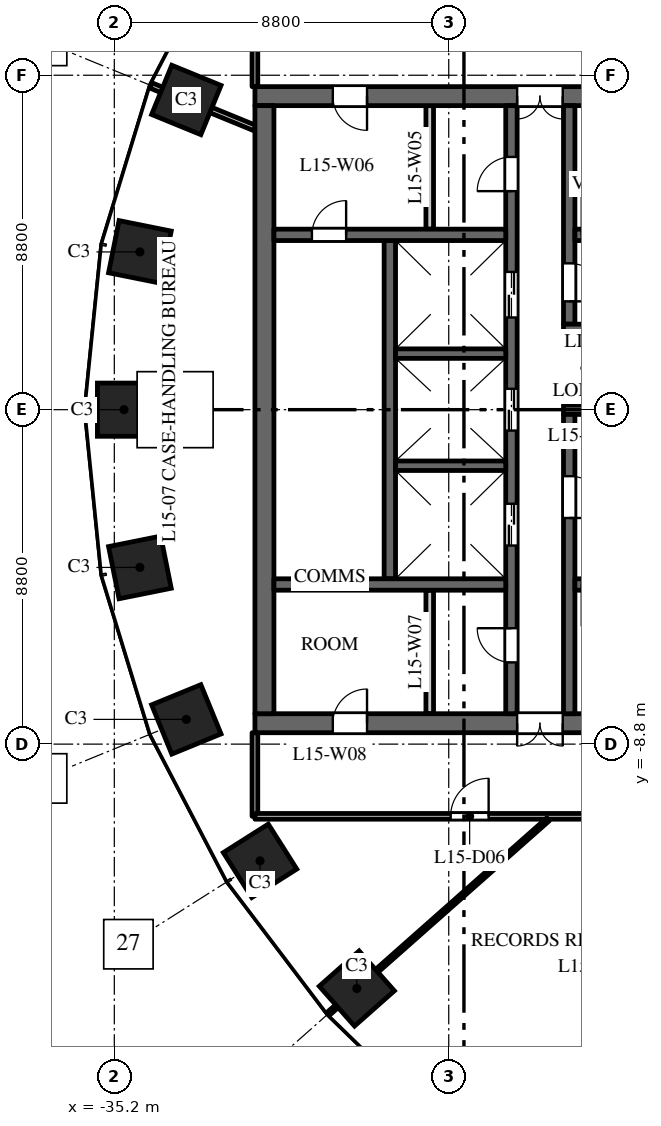
"""IFC4 building model, lengths in metres.
Left out: names, types, materials, properties, quantities, classifications, styles, units other than length and angle.
Written with IfcOpenShell. Run it as: python <this file> out.ifc"""

import sys

from ifc_helpers import new_model, si_unit, direction, frame, frame_2d, origin, origin_2d, place, context, subcontext, project, spatial, rectangle, extrude, element, fill, save


model = new_model("IFC4")
c1 = context("Model", 3, precision=1e-05, world=origin(), true_north=direction((0.0, 1.0)))
c2 = subcontext(c1, "Body", "Model", "MODEL_VIEW")
j1 = project(units=[si_unit("LENGTHUNIT", "METRE"), si_unit("PLANEANGLEUNIT", "RADIAN")], contexts=[c1])
p1 = place(None, origin())
s1 = spatial("IfcSite", under=j1, at=p1, CompositionType="ELEMENT")
p2 = place(p1, origin())
s2 = spatial("IfcBuilding", under=s1, at=p2, CompositionType="ELEMENT")
p3 = place(p2, frame((0.0, 0.0, 70.5)))
s3 = spatial("IfcBuildingStorey", under=s2, at=p3, CompositionType="ELEMENT", Elevation=70.5)
for number, where, z_axis, x_axis in (
    (1, (-33.305, 8.149, 0.0), (0.0, 0.0, 1.0), (-0.379, -0.925, 0.0)),
    (2, (-34.527, 4.151, 0.0), (0.0, 0.0, 1.0), (-0.197, -0.98, 0.0)),
    (3, (-34.945, 0.0, 0.0), (0.0, 0.0, 1.0), (0.0, -1.0, 0.0)),
    (4, (-34.527, -4.151, 0.0), (0.0, 0.0, 1.0), (0.197, -0.98, 0.0)),
    (5, (-33.305, -8.149, 0.0), (0.0, 0.0, 1.0), (0.379, -0.925, 0.0)),
    (6, (-31.365, -11.871, 0.0), (0.0, 0.0, 1.0), (0.535, -0.845, 0.0)),
    (7, (-28.819, -15.23, 0.0), (0.0, 0.0, 1.0), (0.663, -0.749, 0.0)),
):
    element("IfcColumn", number, at=place(p3, frame(where, z_axis=z_axis, x_axis=x_axis)), inside=s3, PredefinedType="COLUMN", context=c2, shape_type="SweptSolid", body=[
        extrude(rectangle(XDim=1.4, YDim=1.4, at=origin_2d()), origin(), (0.0, 0.0, 1.0), 4.0),
    ])
p4 = place(p3, frame((-16.5, 8.25, 0.0), z_axis=(0.0, 0.0, 1.0), x_axis=(-1.0, 0.0, 0.0)))
e8 = element("IfcWall", 8, at=p4, inside=s3, PredefinedType="SHEAR", context=c2, shape_type="SweptSolid", body=[
    extrude(rectangle(XDim=15.0, YDim=0.5, at=frame_2d((7.5, 0.0))), origin(), (0.0, 0.0, 1.0), 3.7),
])
p5 = place(p4, frame((6.9, 0.0, 0.0)))
e9 = element("IfcOpeningElement", 9, at=p5, cuts=e8, PredefinedType="OPENING", context=c2, shape_type="SweptSolid", body=[
    extrude(rectangle(XDim=1.2, YDim=2.1, at=frame_2d((0.6, 1.05))), frame((0.0, 0.26, 0.0), z_axis=(0.0, -1.0, 0.0), x_axis=(1.0, 0.0, 0.0)), (0.0, 0.0, 1.0), 0.52),
])
p6 = place(p4, frame((12.05, 0.0, 0.0)))
e10 = element("IfcOpeningElement", 10, at=p6, cuts=e8, PredefinedType="OPENING", context=c2, shape_type="SweptSolid", body=[
    extrude(rectangle(XDim=0.9, YDim=2.1, at=frame_2d((0.45, 1.05))), frame((0.0, 0.26, 0.0), z_axis=(0.0, -1.0, 0.0), x_axis=(1.0, 0.0, 0.0)), (0.0, 0.0, 1.0), 0.52),
])
p7 = place(p3, frame((-16.5, -8.25, 0.0), z_axis=(0.0, 0.0, 1.0), x_axis=(-1.0, 0.0, 0.0)))
e11 = element("IfcWall", 11, at=p7, inside=s3, PredefinedType="SHEAR", context=c2, shape_type="SweptSolid", body=[
    extrude(rectangle(XDim=15.0, YDim=0.5, at=frame_2d((7.5, 0.0))), origin(), (0.0, 0.0, 1.0), 3.7),
])
p8 = place(p7, frame((6.9, 0.0, 0.0)))
e12 = element("IfcOpeningElement", 12, at=p8, cuts=e11, PredefinedType="OPENING", context=c2, shape_type="SweptSolid", body=[
    extrude(rectangle(XDim=1.2, YDim=2.1, at=frame_2d((0.6, 1.05))), frame((0.0, 0.26, 0.0), z_axis=(0.0, -1.0, 0.0), x_axis=(1.0, 0.0, 0.0)), (0.0, 0.0, 1.0), 0.52),
])
p9 = place(p7, frame((12.05, 0.0, 0.0)))
e13 = element("IfcOpeningElement", 13, at=p9, cuts=e11, PredefinedType="OPENING", context=c2, shape_type="SweptSolid", body=[
    extrude(rectangle(XDim=0.9, YDim=2.1, at=frame_2d((0.45, 1.05))), frame((0.0, 0.26, 0.0), z_axis=(0.0, -1.0, 0.0), x_axis=(1.0, 0.0, 0.0)), (0.0, 0.0, 1.0), 0.52),
])
p10 = place(p3, frame((-27.95, -4.45, 0.0), z_axis=(0.0, 0.0, 1.0), x_axis=(0.0, 1.0, 0.0)))
e14 = element("IfcWall", 14, at=p10, inside=s3, PredefinedType="SHEAR", context=c2, shape_type="SweptSolid", body=[
    extrude(rectangle(XDim=8.9, YDim=0.3, at=frame_2d((4.45, 0.0))), origin(), (0.0, 0.0, 1.0), 3.7),
])
p11 = place(p3, frame((-24.75, -8.0, 0.0), z_axis=(0.0, 0.0, 1.0), x_axis=(0.0, 1.0, 0.0)))
e15 = element("IfcWall", 15, at=p11, inside=s3, PredefinedType="SHEAR", context=c2, shape_type="SweptSolid", body=[
    extrude(rectangle(XDim=16.0, YDim=0.3, at=frame_2d((8.0, 0.0))), origin(), (0.0, 0.0, 1.0), 3.7),
])
p12 = place(p11, frame((4.425, 0.0, 0.0)))
e16 = element("IfcOpeningElement", 16, at=p12, cuts=e15, PredefinedType="OPENING", context=c2, shape_type="SweptSolid", body=[
    extrude(rectangle(XDim=1.1, YDim=2.1, at=frame_2d((0.55, 1.05))), frame((0.0, 0.16, 0.0), z_axis=(0.0, -1.0, 0.0), x_axis=(1.0, 0.0, 0.0)), (0.0, 0.0, 1.0), 0.32),
])
p13 = place(p11, frame((7.45, 0.0, 0.0)))
e17 = element("IfcOpeningElement", 17, at=p13, cuts=e15, PredefinedType="OPENING", context=c2, shape_type="SweptSolid", body=[
    extrude(rectangle(XDim=1.1, YDim=2.1, at=frame_2d((0.55, 1.05))), frame((0.0, 0.16, 0.0), z_axis=(0.0, -1.0, 0.0), x_axis=(1.0, 0.0, 0.0)), (0.0, 0.0, 1.0), 0.32),
])
p14 = place(p11, frame((10.425, 0.0, 0.0)))
e18 = element("IfcOpeningElement", 18, at=p14, cuts=e15, PredefinedType="OPENING", context=c2, shape_type="SweptSolid", body=[
    extrude(rectangle(XDim=1.2, YDim=2.1, at=frame_2d((0.6, 1.05))), frame((0.0, 0.16, 0.0), z_axis=(0.0, -1.0, 0.0), x_axis=(1.0, 0.0, 0.0)), (0.0, 0.0, 1.0), 0.32),
])
p15 = place(p11, frame((13.75, 0.0, 0.0)))
e19 = element("IfcOpeningElement", 19, at=p15, cuts=e15, PredefinedType="OPENING", context=c2, shape_type="SweptSolid", body=[
    extrude(rectangle(XDim=0.9, YDim=2.1, at=frame_2d((0.45, 1.05))), frame((0.0, 0.16, 0.0), z_axis=(0.0, -1.0, 0.0), x_axis=(1.0, 0.0, 0.0)), (0.0, 0.0, 1.0), 0.32),
])
p16 = place(p11, frame((1.35, 0.0, 0.0)))
e20 = element("IfcOpeningElement", 20, at=p16, cuts=e15, PredefinedType="OPENING", context=c2, shape_type="SweptSolid", body=[
    extrude(rectangle(XDim=0.9, YDim=2.1, at=frame_2d((0.45, 1.05))), frame((0.0, 0.16, 0.0), z_axis=(0.0, -1.0, 0.0), x_axis=(1.0, 0.0, 0.0)), (0.0, 0.0, 1.0), 0.32),
])
p17 = place(p3, frame((-20.1, 0.0, 0.0), z_axis=(0.0, 0.0, 1.0), x_axis=(-1.0, 0.0, 0.0)))
e21 = element("IfcWall", 21, at=p17, inside=s3, PredefinedType="SHEAR", context=c2, shape_type="SweptSolid", body=[
    extrude(rectangle(XDim=3.28, YDim=0.25, at=frame_2d((1.64, 0.0))), origin(), (0.0, 0.0, 1.0), 3.7),
])
p18 = place(p3, frame((-31.25, -8.0, 0.0), z_axis=(0.0, 0.0, 1.0), x_axis=(0.0, 1.0, 0.0)))
e22 = element("IfcWall", 22, at=p18, inside=s3, PredefinedType="SHEAR", context=c2, shape_type="SweptSolid", body=[
    extrude(rectangle(XDim=16.0, YDim=0.5, at=frame_2d((8.0, 0.0))), origin(), (0.0, 0.0, 1.0), 3.7),
])
p19 = place(p3, frame((-24.9, 4.6, 0.0), z_axis=(0.0, 0.0, 1.0), x_axis=(-1.0, 0.0, 0.0)))
e23 = element("IfcWall", 23, at=p19, inside=s3, PredefinedType="SHEAR", context=c2, shape_type="SweptSolid", body=[
    extrude(rectangle(XDim=6.1, YDim=0.3, at=frame_2d((3.05, 0.0))), origin(), (0.0, 0.0, 1.0), 3.7),
])
p20 = place(p19, frame((4.2, 0.0, 0.0)))
e24 = element("IfcOpeningElement", 24, at=p20, cuts=e23, PredefinedType="OPENING", context=c2, shape_type="SweptSolid", body=[
    extrude(rectangle(XDim=0.9, YDim=2.1, at=frame_2d((0.45, 1.05))), frame((0.0, 0.16, 0.0), z_axis=(0.0, -1.0, 0.0), x_axis=(1.0, 0.0, 0.0)), (0.0, 0.0, 1.0), 0.32),
])
for number, where, z_axis, x_axis in (
    (25, (-26.9, 4.75, 0.0), (0.0, 0.0, 1.0), (0.0, 1.0, 0.0)),
    (26, (-26.9, -8.0, 0.0), (0.0, 0.0, 1.0), (0.0, 1.0, 0.0)),
):
    element("IfcWall", number, at=place(p3, frame(where, z_axis=z_axis, x_axis=x_axis)), inside=s3, PredefinedType="PARTITIONING", context=c2, shape_type="SweptSolid", body=[
        extrude(rectangle(XDim=3.25, YDim=0.2, at=frame_2d((1.625, 0.0))), origin(), (0.0, 0.0, 1.0), 3.7),
    ])
p21 = place(p3, frame((-24.9, -4.6, 0.0), z_axis=(0.0, 0.0, 1.0), x_axis=(-1.0, 0.0, 0.0)))
e27 = element("IfcWall", 27, at=p21, inside=s3, PredefinedType="SHEAR", context=c2, shape_type="SweptSolid", body=[
    extrude(rectangle(XDim=6.1, YDim=0.3, at=frame_2d((3.05, 0.0))), origin(), (0.0, 0.0, 1.0), 3.7),
])
for number, where, z_axis, x_axis in (
    (28, (-24.9, -1.475, 0.0), (0.0, 0.0, 1.0), (-1.0, 0.0, 0.0)),
    (29, (-24.9, 1.475, 0.0), (0.0, 0.0, 1.0), (-1.0, 0.0, 0.0)),
):
    element("IfcWall", number, at=place(p3, frame(where, z_axis=z_axis, x_axis=x_axis)), inside=s3, PredefinedType="SHEAR", context=c2, shape_type="SweptSolid", body=[
        extrude(rectangle(XDim=2.9, YDim=0.25, at=frame_2d((1.45, 0.0))), origin(), (0.0, 0.0, 1.0), 3.7),
    ])
p22 = place(p3, frame((-23.23, 2.25, 0.0), z_axis=(0.0, 0.0, 1.0), x_axis=(0.0, 1.0, 0.0)))
e30 = element("IfcWall", 30, at=p22, inside=s3, PredefinedType="SHEAR", context=c2, shape_type="SweptSolid", body=[
    extrude(rectangle(XDim=5.75, YDim=0.3, at=frame_2d((2.875, 0.0))), origin(), (0.0, 0.0, 1.0), 3.7),
])
p23 = place(p22, frame((0.6, 0.0, 0.0)))
e31 = element("IfcOpeningElement", 31, at=p23, cuts=e30, PredefinedType="OPENING", context=c2, shape_type="SweptSolid", body=[
    extrude(rectangle(XDim=1.0, YDim=2.1, at=frame_2d((0.5, 1.05))), frame((0.0, 0.16, 0.0), z_axis=(0.0, -1.0, 0.0), x_axis=(1.0, 0.0, 0.0)), (0.0, 0.0, 1.0), 0.32),
])
p24 = place(p3, frame((-23.23, -8.0, 0.0), z_axis=(0.0, 0.0, 1.0), x_axis=(0.0, 1.0, 0.0)))
e32 = element("IfcWall", 32, at=p24, inside=s3, PredefinedType="SHEAR", context=c2, shape_type="SweptSolid", body=[
    extrude(rectangle(XDim=7.875, YDim=0.3, at=frame_2d((3.938, 0.0))), origin(), (0.0, 0.0, 1.0), 3.7),
])
p25 = place(p24, frame((5.15, 0.0, 0.0)))
e33 = element("IfcOpeningElement", 33, at=p25, cuts=e32, PredefinedType="OPENING", context=c2, shape_type="SweptSolid", body=[
    extrude(rectangle(XDim=1.1, YDim=2.1, at=frame_2d((0.55, 1.05))), frame((0.0, 0.16, 0.0), z_axis=(0.0, -1.0, 0.0), x_axis=(1.0, 0.0, 0.0)), (0.0, 0.0, 1.0), 0.32),
])
p26 = place(p3, frame((-16.9, 4.6, 0.0), z_axis=(0.0, 0.0, 1.0), x_axis=(-1.0, 0.0, 0.0)))
e34 = element("IfcWall", 34, at=p26, inside=s3, PredefinedType="SHEAR", context=c2, shape_type="SweptSolid", body=[
    extrude(rectangle(XDim=6.18, YDim=0.3, at=frame_2d((3.09, 0.0))), origin(), (0.0, 0.0, 1.0), 3.7),
])
p27 = place(p26, frame((4.9, 0.0, 0.0)))
e35 = element("IfcOpeningElement", 35, at=p27, cuts=e34, PredefinedType="OPENING", context=c2, shape_type="SweptSolid", body=[
    extrude(rectangle(XDim=1.1, YDim=2.1, at=frame_2d((0.55, 1.05))), frame((0.0, 0.16, 0.0), z_axis=(0.0, -1.0, 0.0), x_axis=(1.0, 0.0, 0.0)), (0.0, 0.0, 1.0), 0.32),
])
p28 = place(p3, frame((-16.9, -4.6, 0.0), z_axis=(0.0, 0.0, 1.0), x_axis=(-1.0, 0.0, 0.0)))
e36 = element("IfcWall", 36, at=p28, inside=s3, PredefinedType="SHEAR", context=c2, shape_type="SweptSolid", body=[
    extrude(rectangle(XDim=6.18, YDim=0.3, at=frame_2d((3.09, 0.0))), origin(), (0.0, 0.0, 1.0), 3.7),
])
p29 = place(p28, frame((4.9, 0.0, 0.0)))
e37 = element("IfcOpeningElement", 37, at=p29, cuts=e36, PredefinedType="OPENING", context=c2, shape_type="SweptSolid", body=[
    extrude(rectangle(XDim=1.1, YDim=2.1, at=frame_2d((0.55, 1.05))), frame((0.0, 0.16, 0.0), z_axis=(0.0, -1.0, 0.0), x_axis=(1.0, 0.0, 0.0)), (0.0, 0.0, 1.0), 0.32),
])
p30 = place(p3, frame((-20.85, 2.125, 0.0), z_axis=(0.0, 0.0, 1.0), x_axis=(-1.0, 0.0, 0.0)))
e38 = element("IfcWall", 38, at=p30, inside=s3, PredefinedType="SHEAR", context=c2, shape_type="SweptSolid", body=[
    extrude(rectangle(XDim=2.53, YDim=0.25, at=frame_2d((1.265, 0.0))), origin(), (0.0, 0.0, 1.0), 3.7),
])
p31 = place(p3, frame((-34.234, 8.53, 0.0), z_axis=(0.0, 0.0, 1.0), x_axis=(0.925344112436, -0.379128307542, 0.0)))
e39 = element("IfcWall", 39, at=p31, inside=s3, PredefinedType="PARTITIONING", context=c2, shape_type="SweptSolid", body=[
    extrude(rectangle(XDim=2.954, YDim=0.15, at=frame_2d((1.477, 0.0))), origin(), (0.0, 0.0, 1.0), 2.85),
])
p32 = place(p3, frame((-31.5, -10.7, 0.0), z_axis=(0.0, 0.0, 1.0), x_axis=(0.0, 1.0, 0.0)))
e40 = element("IfcWall", 40, at=p32, inside=s3, PredefinedType="PARTITIONING", context=c2, shape_type="SweptSolid", body=[
    extrude(rectangle(XDim=2.2, YDim=0.15, at=frame_2d((1.1, 0.0))), origin(), (0.0, 0.0, 1.0), 3.7),
])
p33 = place(p3, frame((-31.5, -10.7, 0.0), z_axis=(0.0, 0.0, 1.0), x_axis=(1.0, 0.0, 0.0)))
e41 = element("IfcWall", 41, at=p33, inside=s3, PredefinedType="PARTITIONING", context=c2, shape_type="SweptSolid", body=[
    extrude(rectangle(XDim=10.396, YDim=0.15, at=frame_2d((5.198, 0.0))), origin(), (0.0, 0.0, 1.0), 3.1),
])
p34 = place(p33, frame((5.15, 0.0, 0.0)))
e42 = element("IfcOpeningElement", 42, at=p34, cuts=e41, PredefinedType="OPENING", context=c2, shape_type="SweptSolid", body=[
    extrude(rectangle(XDim=1.0, YDim=2.1, at=frame_2d((0.5, 1.05))), frame((0.0, 0.085, 0.0), z_axis=(0.0, -1.0, 0.0), x_axis=(1.0, 0.0, 0.0)), (0.0, 0.0, 1.0), 0.17),
])
p35 = place(p3, frame((-31.5, 8.5, 0.0), z_axis=(0.0, 0.0, 1.0), x_axis=(0.0, 1.0, 0.0)))
e43 = element("IfcWall", 43, at=p35, inside=s3, PredefinedType="PARTITIONING", context=c2, shape_type="SweptSolid", body=[
    extrude(rectangle(XDim=2.2, YDim=0.15, at=frame_2d((1.1, 0.0))), origin(), (0.0, 0.0, 1.0), 3.7),
])
p36 = place(p3, frame((-29.569, -15.895, 0.0), z_axis=(0.0, 0.0, 1.0), x_axis=(0.748985701008, 0.662586160198, 0.0)))
e44 = element("IfcWall", 44, at=p36, inside=s3, PredefinedType="PARTITIONING", context=c2, shape_type="SweptSolid", body=[
    extrude(rectangle(XDim=7.723, YDim=0.1, at=frame_2d((3.861, 0.0))), origin(), (0.0, 0.0, 1.0), 2.85),
])
p37 = place(p3, frame((-22.905, -21.542, 0.0), z_axis=(0.0, 0.0, 1.0), x_axis=(0.542244314938, 0.840220865557, 0.0)))
e45 = element("IfcWall", 45, at=p37, inside=s3, PredefinedType="PARTITIONING", context=c2, shape_type="SweptSolid", body=[
    extrude(rectangle(XDim=9.564, YDim=0.1, at=frame_2d((4.782, 0.0))), origin(), (0.0, 0.0, 1.0), 2.85),
])
p38 = place(p12, origin())
e46 = element("IfcDoor", 46, at=p38, inside=s3, OperationType="DOUBLE_DOOR_SLIDING", PredefinedType="DOOR", context=c2, shape_type="SweptSolid", body=[
    extrude(rectangle(XDim=1.1, YDim=2.1, at=frame_2d((0.55, 1.05))), frame((0.0, 0.025, 0.0), z_axis=(0.0, -1.0, 0.0), x_axis=(1.0, 0.0, 0.0)), (0.0, 0.0, 1.0), 0.05),
])
fill(e16, e46)
p39 = place(p13, origin())
e47 = element("IfcDoor", 47, at=p39, inside=s3, OperationType="DOUBLE_DOOR_SLIDING", PredefinedType="DOOR", context=c2, shape_type="SweptSolid", body=[
    extrude(rectangle(XDim=1.1, YDim=2.1, at=frame_2d((0.55, 1.05))), frame((0.0, 0.025, 0.0), z_axis=(0.0, -1.0, 0.0), x_axis=(1.0, 0.0, 0.0)), (0.0, 0.0, 1.0), 0.05),
])
fill(e17, e47)
p40 = place(p14, origin())
e48 = element("IfcDoor", 48, at=p40, inside=s3, OperationType="DOUBLE_DOOR_SLIDING", PredefinedType="DOOR", context=c2, shape_type="SweptSolid", body=[
    extrude(rectangle(XDim=1.2, YDim=2.1, at=frame_2d((0.6, 1.05))), frame((0.0, 0.025, 0.0), z_axis=(0.0, -1.0, 0.0), x_axis=(1.0, 0.0, 0.0)), (0.0, 0.0, 1.0), 0.05),
])
fill(e18, e48)
p41 = place(p27, origin())
e49 = element("IfcDoor", 49, at=p41, inside=s3, OperationType="SINGLE_SWING_RIGHT", PredefinedType="DOOR", context=c2, shape_type="SweptSolid", body=[
    extrude(rectangle(XDim=1.1, YDim=2.1, at=frame_2d((0.55, 1.05))), frame((0.0, 0.025, 0.0), z_axis=(0.0, -1.0, 0.0), x_axis=(1.0, 0.0, 0.0)), (0.0, 0.0, 1.0), 0.05),
])
fill(e35, e49)
p42 = place(p29, origin())
e50 = element("IfcDoor", 50, at=p42, inside=s3, OperationType="SINGLE_SWING_LEFT", PredefinedType="DOOR", context=c2, shape_type="SweptSolid", body=[
    extrude(rectangle(XDim=1.1, YDim=2.1, at=frame_2d((0.55, 1.05))), frame((0.0, 0.025, 0.0), z_axis=(0.0, -1.0, 0.0), x_axis=(1.0, 0.0, 0.0)), (0.0, 0.0, 1.0), 0.05),
])
fill(e37, e50)
p43 = place(p25, origin())
e51 = element("IfcDoor", 51, at=p43, inside=s3, OperationType="SINGLE_SWING_LEFT", PredefinedType="DOOR", context=c2, shape_type="SweptSolid", body=[
    extrude(rectangle(XDim=1.1, YDim=2.1, at=frame_2d((0.55, 1.05))), frame((0.0, 0.025, 0.0), z_axis=(0.0, -1.0, 0.0), x_axis=(1.0, 0.0, 0.0)), (0.0, 0.0, 1.0), 0.05),
])
fill(e33, e51)
p44 = place(p23, origin())
e52 = element("IfcDoor", 52, at=p44, inside=s3, OperationType="SINGLE_SWING_LEFT", PredefinedType="DOOR", context=c2, shape_type="SweptSolid", body=[
    extrude(rectangle(XDim=1.0, YDim=2.1, at=frame_2d((0.5, 1.05))), frame((0.0, 0.025, 0.0), z_axis=(0.0, -1.0, 0.0), x_axis=(1.0, 0.0, 0.0)), (0.0, 0.0, 1.0), 0.05),
])
fill(e31, e52)
p45 = place(p5, origin())
e53 = element("IfcDoor", 53, at=p45, inside=s3, OperationType="DOUBLE_DOOR_DOUBLE_SWING", PredefinedType="DOOR", context=c2, shape_type="SweptSolid", body=[
    extrude(rectangle(XDim=1.2, YDim=2.1, at=frame_2d((0.6, 1.05))), frame((0.0, 0.025, 0.0), z_axis=(0.0, -1.0, 0.0), x_axis=(1.0, 0.0, 0.0)), (0.0, 0.0, 1.0), 0.05),
])
fill(e9, e53)
p46 = place(p8, origin())
e54 = element("IfcDoor", 54, at=p46, inside=s3, OperationType="DOUBLE_DOOR_DOUBLE_SWING", PredefinedType="DOOR", context=c2, shape_type="SweptSolid", body=[
    extrude(rectangle(XDim=1.2, YDim=2.1, at=frame_2d((0.6, 1.05))), frame((0.0, 0.025, 0.0), z_axis=(0.0, -1.0, 0.0), x_axis=(1.0, 0.0, 0.0)), (0.0, 0.0, 1.0), 0.05),
])
fill(e12, e54)
p47 = place(p15, origin())
e55 = element("IfcDoor", 55, at=p47, inside=s3, OperationType="SINGLE_SWING_RIGHT", PredefinedType="DOOR", context=c2, shape_type="SweptSolid", body=[
    extrude(rectangle(XDim=0.9, YDim=2.1, at=frame_2d((0.45, 1.05))), frame((0.0, 0.025, 0.0), z_axis=(0.0, -1.0, 0.0), x_axis=(1.0, 0.0, 0.0)), (0.0, 0.0, 1.0), 0.05),
])
fill(e19, e55)
p48 = place(p6, origin())
e56 = element("IfcDoor", 56, at=p48, inside=s3, OperationType="SINGLE_SWING_RIGHT", PredefinedType="DOOR", context=c2, shape_type="SweptSolid", body=[
    extrude(rectangle(XDim=0.9, YDim=2.1, at=frame_2d((0.45, 1.05))), frame((0.0, 0.025, 0.0), z_axis=(0.0, -1.0, 0.0), x_axis=(1.0, 0.0, 0.0)), (0.0, 0.0, 1.0), 0.05),
])
fill(e10, e56)
p49 = place(p16, origin())
e57 = element("IfcDoor", 57, at=p49, inside=s3, OperationType="SINGLE_SWING_LEFT", PredefinedType="DOOR", context=c2, shape_type="SweptSolid", body=[
    extrude(rectangle(XDim=0.9, YDim=2.1, at=frame_2d((0.45, 1.05))), frame((0.0, 0.025, 0.0), z_axis=(0.0, -1.0, 0.0), x_axis=(1.0, 0.0, 0.0)), (0.0, 0.0, 1.0), 0.05),
])
fill(e20, e57)
p50 = place(p9, origin())
e58 = element("IfcDoor", 58, at=p50, inside=s3, OperationType="SINGLE_SWING_LEFT", PredefinedType="DOOR", context=c2, shape_type="SweptSolid", body=[
    extrude(rectangle(XDim=0.9, YDim=2.1, at=frame_2d((0.45, 1.05))), frame((0.0, 0.025, 0.0), z_axis=(0.0, -1.0, 0.0), x_axis=(1.0, 0.0, 0.0)), (0.0, 0.0, 1.0), 0.05),
])
fill(e13, e58)
p51 = place(p20, origin())
e59 = element("IfcDoor", 59, at=p51, inside=s3, OperationType="SINGLE_SWING_LEFT", PredefinedType="DOOR", context=c2, shape_type="SweptSolid", body=[
    extrude(rectangle(XDim=0.9, YDim=2.1, at=frame_2d((0.45, 1.05))), frame((0.0, 0.025, 0.0), z_axis=(0.0, -1.0, 0.0), x_axis=(1.0, 0.0, 0.0)), (0.0, 0.0, 1.0), 0.05),
])
fill(e24, e59)
p52 = place(p34, origin())
e60 = element("IfcDoor", 60, at=p52, inside=s3, OperationType="SINGLE_SWING_RIGHT", PredefinedType="DOOR", context=c2, shape_type="SweptSolid", body=[
    extrude(rectangle(XDim=1.0, YDim=2.1, at=frame_2d((0.5, 1.05))), frame((0.0, 0.025, 0.0), z_axis=(0.0, -1.0, 0.0), x_axis=(1.0, 0.0, 0.0)), (0.0, 0.0, 1.0), 0.05),
])
fill(e42, e60)
save(model, sys.argv[1])
